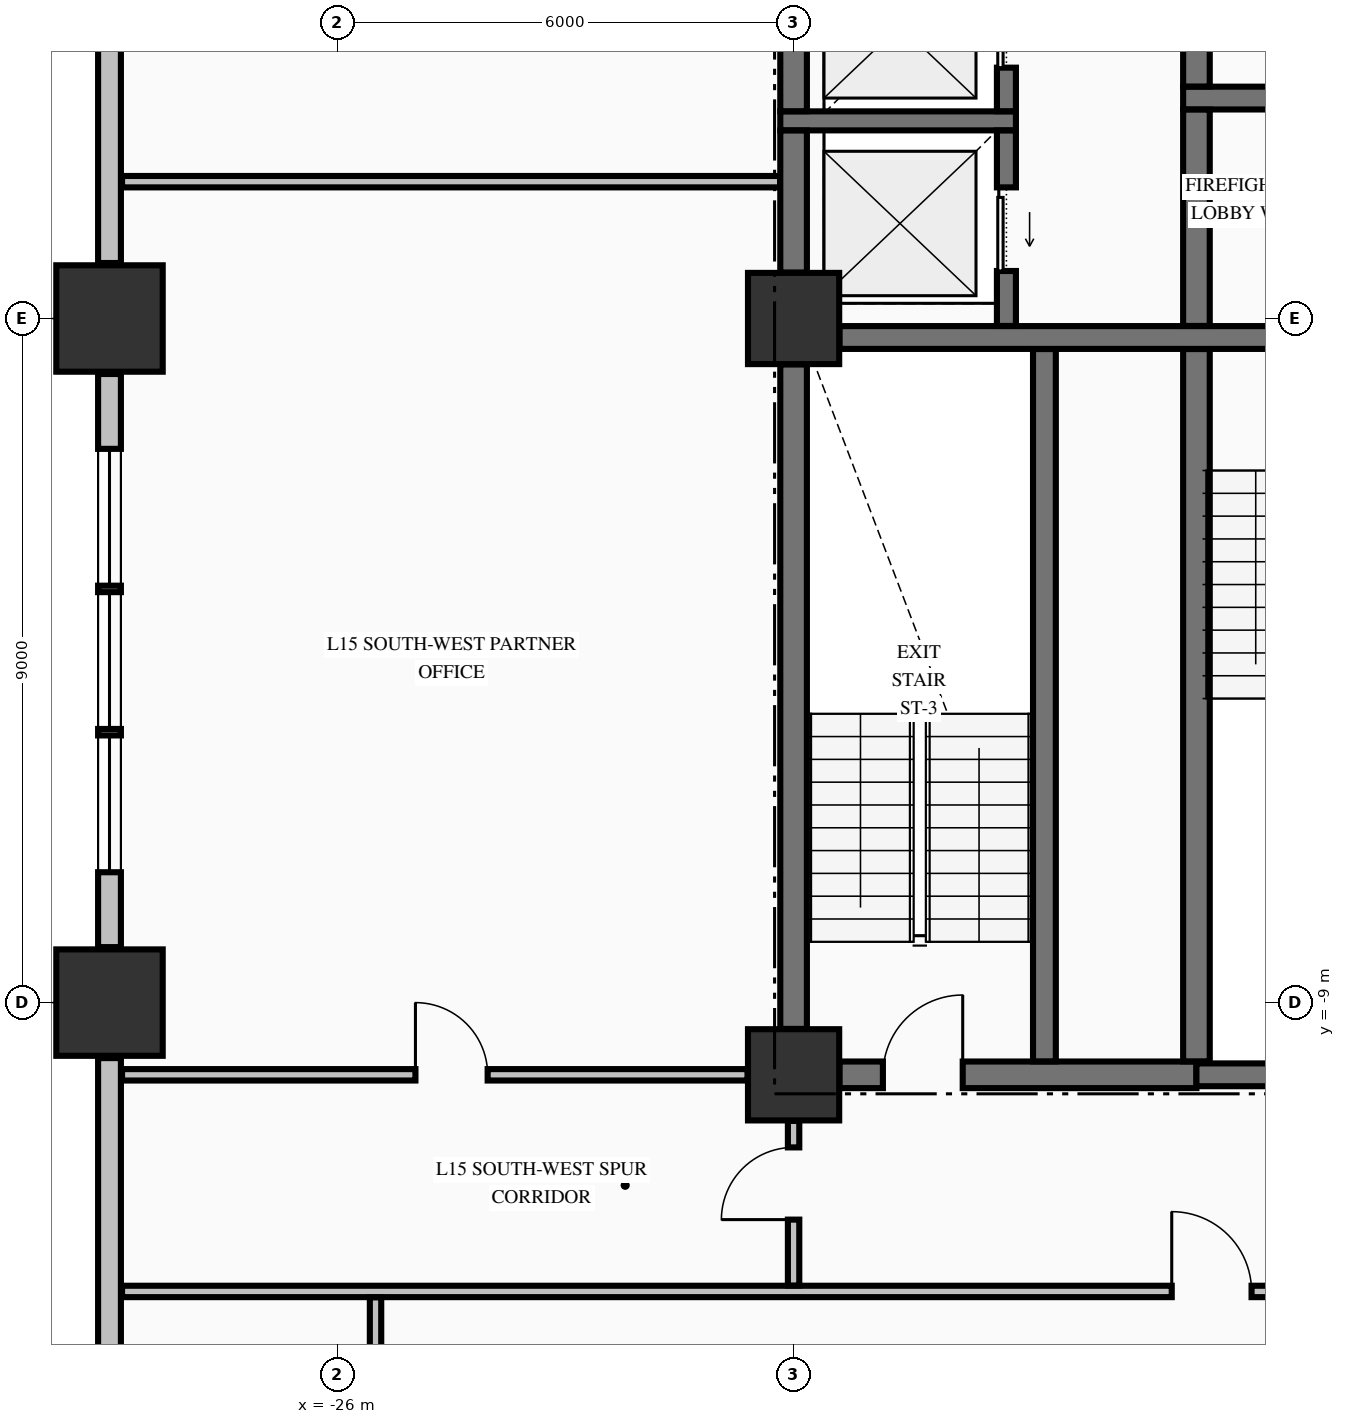
"""IFC4 building model, lengths in metres.
Left out: names, types, materials, properties, quantities, classifications, styles, units other than length and angle.
Written with IfcOpenShell. Run it as: python <this file> out.ifc"""

import sys

from ifc_helpers import new_model, si_unit, direction, frame, frame_2d, origin, origin_2d, place, context, subcontext, project, spatial, rectangle, extrude, element, fill, save


model = new_model("IFC4")
c1 = context("Model", 3, precision=1e-05, world=origin(), true_north=direction((0.0, 1.0)))
c2 = subcontext(c1, "Body", "Model", "MODEL_VIEW")
j1 = project(units=[si_unit("LENGTHUNIT", "METRE"), si_unit("PLANEANGLEUNIT", "RADIAN")], contexts=[c1])
p1 = place(None, origin())
s1 = spatial("IfcSite", under=j1, at=p1, CompositionType="ELEMENT")
p2 = place(p1, origin())
s2 = spatial("IfcBuilding", under=s1, at=p2, CompositionType="ELEMENT")
p3 = place(p2, frame((0.0, 0.0, 64.33)))
s3 = spatial("IfcBuildingStorey", under=s2, at=p3, CompositionType="ELEMENT", Elevation=64.33)
for number, where, z_axis, x_axis in (
    (1, (-29.0, -9.0, -0.25), (0.0, 0.0, 1.0), (1.0, 0.0, 0.0)),
    (2, (-29.0, 0.0, -0.25), (0.0, 0.0, 1.0), (1.0, 0.0, 0.0)),
):
    element("IfcColumn", number, at=place(p3, frame(where, z_axis=z_axis, x_axis=x_axis)), inside=s3, PredefinedType="COLUMN", context=c2, shape_type="SweptSolid", body=[
        extrude(rectangle(XDim=1.4, YDim=1.4, at=origin_2d()), origin(), (0.0, 0.0, 1.0), 3.57),
    ])
for number, where, z_axis, x_axis in (
    (3, (-20.0, -9.95, -0.25), (0.0, 0.0, 1.0), (1.0, 0.0, 0.0)),
    (4, (-20.0, 0.0, -0.25), (0.0, 0.0, 1.0), (1.0, 0.0, 0.0)),
):
    element("IfcColumn", number, at=place(p3, frame(where, z_axis=z_axis, x_axis=x_axis)), inside=s3, PredefinedType="COLUMN", context=c2, shape_type="SweptSolid", body=[
        extrude(rectangle(XDim=1.2, YDim=1.2, at=origin_2d()), origin(), (0.0, 0.0, 1.0), 3.57),
    ])
p4 = place(p3, frame((-29.0, -9.73, 0.0), z_axis=(0.0, 0.0, 1.0), x_axis=(0.0, -1.0, 0.0)))
e5 = element("IfcWall", 5, at=p4, inside=s3, PredefinedType="STANDARD", context=c2, shape_type="SweptSolid", body=[
    extrude(rectangle(XDim=12.54, YDim=0.3, at=frame_2d((6.27, 0.0))), origin(), (0.0, 0.0, 1.0), 2.712),
])
p5 = place(p3, frame((-29.0, -0.73, 0.0), z_axis=(0.0, 0.0, 1.0), x_axis=(0.0, -1.0, 0.0)))
e6 = element("IfcWall", 6, at=p5, inside=s3, PredefinedType="STANDARD", context=c2, shape_type="SweptSolid", body=[
    extrude(rectangle(XDim=7.54, YDim=0.3, at=frame_2d((3.77, 0.0))), origin(), (0.0, 0.0, 1.0), 2.712),
])
p6 = place(p5, frame((0.985, 0.0, 0.78)))
e7 = element("IfcOpeningElement", 7, at=p6, cuts=e6, PredefinedType="OPENING", context=c2, shape_type="SweptSolid", body=[
    extrude(rectangle(XDim=1.8, YDim=1.72, at=frame_2d((0.9, 0.86))), frame((0.0, 0.16, 0.0), z_axis=(0.0, -1.0, 0.0), x_axis=(1.0, 0.0, 0.0)), (0.0, 0.0, 1.0), 0.32),
])
p7 = place(p5, frame((2.87, 0.0, 0.78)))
e8 = element("IfcOpeningElement", 8, at=p7, cuts=e6, PredefinedType="OPENING", context=c2, shape_type="SweptSolid", body=[
    extrude(rectangle(XDim=1.8, YDim=1.72, at=frame_2d((0.9, 0.86))), frame((0.0, 0.16, 0.0), z_axis=(0.0, -1.0, 0.0), x_axis=(1.0, 0.0, 0.0)), (0.0, 0.0, 1.0), 0.32),
])
p8 = place(p5, frame((4.755, 0.0, 0.78)))
e9 = element("IfcOpeningElement", 9, at=p8, cuts=e6, PredefinedType="OPENING", context=c2, shape_type="SweptSolid", body=[
    extrude(rectangle(XDim=1.8, YDim=1.72, at=frame_2d((0.9, 0.86))), frame((0.0, 0.16, 0.0), z_axis=(0.0, -1.0, 0.0), x_axis=(1.0, 0.0, 0.0)), (0.0, 0.0, 1.0), 0.32),
])
p9 = place(p3, frame((-29.0, 8.27, 0.0), z_axis=(0.0, 0.0, 1.0), x_axis=(0.0, -1.0, 0.0)))
e10 = element("IfcWall", 10, at=p9, inside=s3, PredefinedType="STANDARD", context=c2, shape_type="SweptSolid", body=[
    extrude(rectangle(XDim=7.54, YDim=0.3, at=frame_2d((3.77, 0.0))), origin(), (0.0, 0.0, 1.0), 2.712),
])
p10 = place(p9, frame((0.985, 0.0, 0.78)))
e11 = element("IfcOpeningElement", 11, at=p10, cuts=e10, PredefinedType="OPENING", context=c2, shape_type="SweptSolid", body=[
    extrude(rectangle(XDim=1.8, YDim=1.72, at=frame_2d((0.9, 0.86))), frame((0.0, 0.16, 0.0), z_axis=(0.0, -1.0, 0.0), x_axis=(1.0, 0.0, 0.0)), (0.0, 0.0, 1.0), 0.32),
])
p11 = place(p9, frame((2.87, 0.0, 0.78)))
e12 = element("IfcOpeningElement", 12, at=p11, cuts=e10, PredefinedType="OPENING", context=c2, shape_type="SweptSolid", body=[
    extrude(rectangle(XDim=1.8, YDim=1.72, at=frame_2d((0.9, 0.86))), frame((0.0, 0.16, 0.0), z_axis=(0.0, -1.0, 0.0), x_axis=(1.0, 0.0, 0.0)), (0.0, 0.0, 1.0), 0.32),
])
p12 = place(p3, frame((-19.396, -9.95, 0.0), z_axis=(0.0, 0.0, 1.0), x_axis=(1.0, 0.0, 0.0)))
e13 = element("IfcWall", 13, at=p12, inside=s3, PredefinedType="SHEAR", context=c2, shape_type="SweptSolid", body=[
    extrude(rectangle(XDim=4.696, YDim=0.35, at=frame_2d((2.348, 0.0))), origin(), (0.0, 0.0, 1.0), 3.32),
])
p13 = place(p12, frame((0.571, 0.0, 0.0)))
e14 = element("IfcOpeningElement", 14, at=p13, cuts=e13, PredefinedType="OPENING", context=c2, shape_type="SweptSolid", body=[
    extrude(rectangle(XDim=1.05, YDim=2.15, at=frame_2d((0.525, 1.075))), frame((0.0, 0.185, 0.0), z_axis=(0.0, -1.0, 0.0), x_axis=(1.0, 0.0, 0.0)), (0.0, 0.0, 1.0), 0.37),
])
p14 = place(p3, frame((-14.7, -9.95, 0.0), z_axis=(0.0, 0.0, 1.0), x_axis=(1.0, 0.0, 0.0)))
e15 = element("IfcWall", 15, at=p14, inside=s3, PredefinedType="SHEAR", context=c2, shape_type="SweptSolid", body=[
    extrude(rectangle(XDim=3.096, YDim=0.3, at=frame_2d((1.548, 0.0))), origin(), (0.0, 0.0, 1.0), 3.32),
])
p15 = place(p3, frame((-19.396, -0.25, 0.0), z_axis=(0.0, 0.0, 1.0), x_axis=(1.0, 0.0, 0.0)))
e16 = element("IfcWall", 16, at=p15, inside=s3, PredefinedType="SHEAR", context=c2, shape_type="SweptSolid", body=[
    extrude(rectangle(XDim=7.792, YDim=0.3, at=frame_2d((3.896, 0.0))), origin(), (0.0, 0.0, 1.0), 3.32),
])
p16 = place(p15, frame((5.696, 0.0, 0.0)))
e17 = element("IfcOpeningElement", 17, at=p16, cuts=e16, PredefinedType="OPENING", context=c2, shape_type="SweptSolid", body=[
    extrude(rectangle(XDim=1.1, YDim=2.15, at=frame_2d((0.55, 1.075))), frame((0.0, 0.16, 0.0), z_axis=(0.0, -1.0, 0.0), x_axis=(1.0, 0.0, 0.0)), (0.0, 0.0, 1.0), 0.32),
])
p17 = place(p3, frame((-20.175, 2.6, 0.0), z_axis=(0.0, 0.0, 1.0), x_axis=(1.0, 0.0, 0.0)))
e18 = element("IfcWall", 18, at=p17, inside=s3, PredefinedType="SOLIDWALL", context=c2, shape_type="SweptSolid", body=[
    extrude(rectangle(XDim=3.1, YDim=0.25, at=frame_2d((1.55, 0.0))), origin(), (0.0, 0.0, 1.0), 3.32),
])
p18 = place(p3, frame((-14.875, 2.9, 0.0), z_axis=(0.0, 0.0, 1.0), x_axis=(1.0, 0.0, 0.0)))
e19 = element("IfcWall", 19, at=p18, inside=s3, PredefinedType="SHEAR", context=c2, shape_type="SweptSolid", body=[
    extrude(rectangle(XDim=4.025, YDim=0.3, at=frame_2d((2.012, 0.0))), origin(), (0.0, 0.0, 1.0), 3.32),
])
p19 = place(p18, frame((2.075, 0.0, 0.0)))
e20 = element("IfcOpeningElement", 20, at=p19, cuts=e19, PredefinedType="OPENING", context=c2, shape_type="SweptSolid", body=[
    extrude(rectangle(XDim=1.1, YDim=2.2, at=frame_2d((0.55, 1.1))), frame((0.0, 0.16, 0.0), z_axis=(0.0, -1.0, 0.0), x_axis=(1.0, 0.0, 0.0)), (0.0, 0.0, 1.0), 0.32),
])
p20 = place(p3, frame((-28.835, -12.8, 0.0), z_axis=(0.0, 0.0, 1.0), x_axis=(1.0, 0.0, 0.0)))
e21 = element("IfcWall", 21, at=p20, inside=s3, PredefinedType="PARTITIONING", context=c2, shape_type="SweptSolid", body=[
    extrude(rectangle(XDim=52.67, YDim=0.15, at=frame_2d((26.335, 0.0))), origin(), (0.0, 0.0, 1.0), 3.32),
])
p21 = place(p20, frame((13.81, 0.0, 0.0)))
e22 = element("IfcOpeningElement", 22, at=p21, cuts=e21, PredefinedType="OPENING", context=c2, shape_type="SweptSolid", body=[
    extrude(rectangle(XDim=1.05, YDim=2.15, at=frame_2d((0.525, 1.075))), frame((0.0, 0.085, 0.0), z_axis=(0.0, -1.0, 0.0), x_axis=(1.0, 0.0, 0.0)), (0.0, 0.0, 1.0), 0.17),
])
p22 = place(p20, frame((25.01, 0.0, 0.0)))
e23 = element("IfcOpeningElement", 23, at=p22, cuts=e21, PredefinedType="OPENING", context=c2, shape_type="SweptSolid", body=[
    extrude(rectangle(XDim=1.05, YDim=2.15, at=frame_2d((0.525, 1.075))), frame((0.0, 0.085, 0.0), z_axis=(0.0, -1.0, 0.0), x_axis=(1.0, 0.0, 0.0)), (0.0, 0.0, 1.0), 0.17),
])
p23 = place(p20, frame((32.56, 0.0, 0.0)))
e24 = element("IfcOpeningElement", 24, at=p23, cuts=e21, PredefinedType="OPENING", context=c2, shape_type="SweptSolid", body=[
    extrude(rectangle(XDim=1.05, YDim=2.15, at=frame_2d((0.525, 1.075))), frame((0.0, 0.085, 0.0), z_axis=(0.0, -1.0, 0.0), x_axis=(1.0, 0.0, 0.0)), (0.0, 0.0, 1.0), 0.17),
])
p24 = place(p3, frame((-28.835, -9.95, 0.0), z_axis=(0.0, 0.0, 1.0), x_axis=(1.0, 0.0, 0.0)))
e25 = element("IfcWall", 25, at=p24, inside=s3, PredefinedType="PARTITIONING", context=c2, shape_type="SweptSolid", body=[
    extrude(rectangle(XDim=8.229, YDim=0.15, at=frame_2d((4.115, 0.0))), origin(), (0.0, 0.0, 1.0), 3.32),
])
p25 = place(p24, frame((3.86, 0.0, 0.0)))
e26 = element("IfcOpeningElement", 26, at=p25, cuts=e25, PredefinedType="OPENING", context=c2, shape_type="SweptSolid", body=[
    extrude(rectangle(XDim=0.95, YDim=2.15, at=frame_2d((0.475, 1.075))), frame((0.0, 0.085, 0.0), z_axis=(0.0, -1.0, 0.0), x_axis=(1.0, 0.0, 0.0)), (0.0, 0.0, 1.0), 0.17),
])
p26 = place(p3, frame((-28.835, 1.8, 0.0), z_axis=(0.0, 0.0, 1.0), x_axis=(1.0, 0.0, 0.0)))
e27 = element("IfcWall", 27, at=p26, inside=s3, PredefinedType="PARTITIONING", context=c2, shape_type="SweptSolid", body=[
    extrude(rectangle(XDim=8.657, YDim=0.15, at=frame_2d((4.329, 0.0))), origin(), (0.0, 0.0, 1.0), 3.32),
])
p27 = place(p3, frame((-20.0, -9.346, 0.0), z_axis=(0.0, 0.0, 1.0), x_axis=(0.0, 1.0, 0.0)))
e28 = element("IfcWall", 28, at=p27, inside=s3, PredefinedType="SHEAR", context=c2, shape_type="SweptSolid", body=[
    extrude(rectangle(XDim=8.742, YDim=0.35, at=frame_2d((4.371, 0.0))), origin(), (0.0, 0.0, 1.0), 3.32),
])
p28 = place(p3, frame((-20.0, 0.604, 0.0), z_axis=(0.0, 0.0, 1.0), x_axis=(0.0, 1.0, 0.0)))
e29 = element("IfcWall", 29, at=p28, inside=s3, PredefinedType="SHEAR", context=c2, shape_type="SweptSolid", body=[
    extrude(rectangle(XDim=1.869, YDim=0.35, at=frame_2d((0.935, 0.0))), origin(), (0.0, 0.0, 1.0), 3.32),
])
p29 = place(p3, frame((-20.0, 2.727, 0.0), z_axis=(0.0, 0.0, 1.0), x_axis=(0.0, 1.0, 0.0)))
e30 = element("IfcWall", 30, at=p29, inside=s3, PredefinedType="SHEAR", context=c2, shape_type="SweptSolid", body=[
    extrude(rectangle(XDim=2.246, YDim=0.35, at=frame_2d((1.123, 0.0))), origin(), (0.0, 0.0, 1.0), 3.32),
])
p30 = place(p3, frame((-17.2, -0.098, 0.0), z_axis=(0.0, 0.0, 1.0), x_axis=(0.0, 1.0, 0.0)))
e31 = element("IfcWall", 31, at=p30, inside=s3, PredefinedType="SOLIDWALL", context=c2, shape_type="SweptSolid", body=[
    extrude(rectangle(XDim=2.571, YDim=0.25, at=frame_2d((1.285, 0.0))), origin(), (0.0, 0.0, 1.0), 3.32),
])
p31 = place(p30, frame((0.723, 0.0, 0.0)))
e32 = element("IfcOpeningElement", 32, at=p31, cuts=e31, PredefinedType="OPENING", context=c2, shape_type="SweptSolid", body=[
    extrude(rectangle(XDim=1.1, YDim=2.2, at=frame_2d((0.55, 1.1))), frame((0.0, 0.135, 0.0), z_axis=(0.0, -1.0, 0.0), x_axis=(1.0, 0.0, 0.0)), (0.0, 0.0, 1.0), 0.27),
])
p32 = place(p3, frame((-17.2, 2.727, 0.0), z_axis=(0.0, 0.0, 1.0), x_axis=(0.0, 1.0, 0.0)))
e33 = element("IfcWall", 33, at=p32, inside=s3, PredefinedType="SOLIDWALL", context=c2, shape_type="SweptSolid", body=[
    extrude(rectangle(XDim=2.246, YDim=0.25, at=frame_2d((1.123, 0.0))), origin(), (0.0, 0.0, 1.0), 3.32),
])
p33 = place(p32, frame((0.573, 0.0, 0.0)))
e34 = element("IfcOpeningElement", 34, at=p33, cuts=e33, PredefinedType="OPENING", context=c2, shape_type="SweptSolid", body=[
    extrude(rectangle(XDim=1.1, YDim=2.2, at=frame_2d((0.55, 1.1))), frame((0.0, 0.135, 0.0), z_axis=(0.0, -1.0, 0.0), x_axis=(1.0, 0.0, 0.0)), (0.0, 0.0, 1.0), 0.27),
])
p34 = place(p3, frame((-16.7, -9.773, 0.0), z_axis=(0.0, 0.0, 1.0), x_axis=(0.0, 1.0, 0.0)))
e35 = element("IfcWall", 35, at=p34, inside=s3, PredefinedType="SHEAR", context=c2, shape_type="SweptSolid", body=[
    extrude(rectangle(XDim=9.371, YDim=0.3, at=frame_2d((4.686, 0.0))), origin(), (0.0, 0.0, 1.0), 3.32),
])
p35 = place(p3, frame((-14.7, -9.773, 0.0), z_axis=(0.0, 0.0, 1.0), x_axis=(0.0, 1.0, 0.0)))
e36 = element("IfcWall", 36, at=p35, inside=s3, PredefinedType="SHEAR", context=c2, shape_type="SweptSolid", body=[
    extrude(rectangle(XDim=9.371, YDim=0.35, at=frame_2d((4.686, 0.0))), origin(), (0.0, 0.0, 1.0), 3.32),
])
p36 = place(p3, frame((-14.7, -0.098, 0.0), z_axis=(0.0, 0.0, 1.0), x_axis=(0.0, 1.0, 0.0)))
e37 = element("IfcWall", 37, at=p36, inside=s3, PredefinedType="SHEAR", context=c2, shape_type="SweptSolid", body=[
    extrude(rectangle(XDim=2.846, YDim=0.35, at=frame_2d((1.423, 0.0))), origin(), (0.0, 0.0, 1.0), 3.32),
])
p37 = place(p3, frame((-14.7, 3.052, 0.0), z_axis=(0.0, 0.0, 1.0), x_axis=(0.0, 1.0, 0.0)))
e38 = element("IfcWall", 38, at=p37, inside=s3, PredefinedType="SHEAR", context=c2, shape_type="SweptSolid", body=[
    extrude(rectangle(XDim=2.496, YDim=0.35, at=frame_2d((1.248, 0.0))), origin(), (0.0, 0.0, 1.0), 3.32),
])
p38 = place(p3, frame((-25.5, -22.294, 0.0), z_axis=(0.0, 0.0, 1.0), x_axis=(0.0, 1.0, 0.0)))
e39 = element("IfcWall", 39, at=p38, inside=s3, PredefinedType="PARTITIONING", context=c2, shape_type="SweptSolid", body=[
    extrude(rectangle(XDim=9.416, YDim=0.15, at=frame_2d((4.708, 0.0))), origin(), (0.0, 0.0, 1.0), 3.32),
])
p39 = place(p3, frame((-20.0, -12.722, 0.0), z_axis=(0.0, 0.0, 1.0), x_axis=(0.0, 1.0, 0.0)))
e40 = element("IfcWall", 40, at=p39, inside=s3, PredefinedType="PARTITIONING", context=c2, shape_type="SweptSolid", body=[
    extrude(rectangle(XDim=2.166, YDim=0.15, at=frame_2d((1.083, 0.0))), origin(), (0.0, 0.0, 1.0), 2.66),
])
p40 = place(p39, frame((0.867, 0.0, 0.0)))
e41 = element("IfcOpeningElement", 41, at=p40, cuts=e40, PredefinedType="OPENING", context=c2, shape_type="SweptSolid", body=[
    extrude(rectangle(XDim=0.95, YDim=2.15, at=frame_2d((0.475, 1.075))), frame((0.0, 0.085, 0.0), z_axis=(0.0, -1.0, 0.0), x_axis=(1.0, 0.0, 0.0)), (0.0, 0.0, 1.0), 0.17),
])
p41 = place(p6, origin())
e42 = element("IfcWindow", 42, at=p41, inside=s3, PartitioningType="SINGLE_PANEL", PredefinedType="WINDOW", context=c2, shape_type="SweptSolid", body=[
    extrude(rectangle(XDim=1.8, YDim=1.72, at=frame_2d((0.9, 0.86))), frame((0.0, 0.03, 0.0), z_axis=(0.0, -1.0, 0.0), x_axis=(1.0, 0.0, 0.0)), (0.0, 0.0, 1.0), 0.06),
])
fill(e7, e42)
p42 = place(p7, origin())
e43 = element("IfcWindow", 43, at=p42, inside=s3, PartitioningType="SINGLE_PANEL", PredefinedType="WINDOW", context=c2, shape_type="SweptSolid", body=[
    extrude(rectangle(XDim=1.8, YDim=1.72, at=frame_2d((0.9, 0.86))), frame((0.0, 0.03, 0.0), z_axis=(0.0, -1.0, 0.0), x_axis=(1.0, 0.0, 0.0)), (0.0, 0.0, 1.0), 0.06),
])
fill(e8, e43)
p43 = place(p8, origin())
e44 = element("IfcWindow", 44, at=p43, inside=s3, PartitioningType="SINGLE_PANEL", PredefinedType="WINDOW", context=c2, shape_type="SweptSolid", body=[
    extrude(rectangle(XDim=1.8, YDim=1.72, at=frame_2d((0.9, 0.86))), frame((0.0, 0.03, 0.0), z_axis=(0.0, -1.0, 0.0), x_axis=(1.0, 0.0, 0.0)), (0.0, 0.0, 1.0), 0.06),
])
fill(e9, e44)
p44 = place(p13, origin())
e45 = element("IfcDoor", 45, at=p44, inside=s3, OperationType="SINGLE_SWING_RIGHT", PredefinedType="DOOR", context=c2, shape_type="SweptSolid", body=[
    extrude(rectangle(XDim=1.05, YDim=2.15, at=frame_2d((0.525, 1.075))), frame((0.0, 0.025, 0.0), z_axis=(0.0, -1.0, 0.0), x_axis=(1.0, 0.0, 0.0)), (0.0, 0.0, 1.0), 0.05),
])
fill(e14, e45)
p45 = place(p31, origin())
e46 = element("IfcDoor", 46, at=p45, inside=s3, OperationType="SLIDING_TO_LEFT", PredefinedType="DOOR", context=c2, shape_type="SweptSolid", body=[
    extrude(rectangle(XDim=1.1, YDim=2.2, at=frame_2d((0.55, 1.1))), frame((0.0, 0.025, 0.0), z_axis=(0.0, -1.0, 0.0), x_axis=(1.0, 0.0, 0.0)), (0.0, 0.0, 1.0), 0.05),
])
fill(e32, e46)
p46 = place(p33, origin())
e47 = element("IfcDoor", 47, at=p46, inside=s3, OperationType="SLIDING_TO_LEFT", PredefinedType="DOOR", context=c2, shape_type="SweptSolid", body=[
    extrude(rectangle(XDim=1.1, YDim=2.2, at=frame_2d((0.55, 1.1))), frame((0.0, 0.025, 0.0), z_axis=(0.0, -1.0, 0.0), x_axis=(1.0, 0.0, 0.0)), (0.0, 0.0, 1.0), 0.05),
])
fill(e34, e47)
p47 = place(p21, origin())
e48 = element("IfcDoor", 48, at=p47, inside=s3, OperationType="SINGLE_SWING_LEFT", PredefinedType="DOOR", context=c2, shape_type="SweptSolid", body=[
    extrude(rectangle(XDim=1.05, YDim=2.15, at=frame_2d((0.525, 1.075))), frame((0.0, 0.025, 0.0), z_axis=(0.0, -1.0, 0.0), x_axis=(1.0, 0.0, 0.0)), (0.0, 0.0, 1.0), 0.05),
])
fill(e22, e48)
p48 = place(p40, origin())
e49 = element("IfcDoor", 49, at=p48, inside=s3, OperationType="SINGLE_SWING_LEFT", PredefinedType="DOOR", context=c2, shape_type="SweptSolid", body=[
    extrude(rectangle(XDim=0.95, YDim=2.15, at=frame_2d((0.475, 1.075))), frame((0.0, 0.025, 0.0), z_axis=(0.0, -1.0, 0.0), x_axis=(1.0, 0.0, 0.0)), (0.0, 0.0, 1.0), 0.05),
])
fill(e41, e49)
p49 = place(p25, origin())
e50 = element("IfcDoor", 50, at=p49, inside=s3, OperationType="SINGLE_SWING_LEFT", PredefinedType="DOOR", context=c2, shape_type="SweptSolid", body=[
    extrude(rectangle(XDim=0.95, YDim=2.15, at=frame_2d((0.475, 1.075))), frame((0.0, 0.025, 0.0), z_axis=(0.0, -1.0, 0.0), x_axis=(1.0, 0.0, 0.0)), (0.0, 0.0, 1.0), 0.05),
])
fill(e26, e50)
save(model, sys.argv[1])
